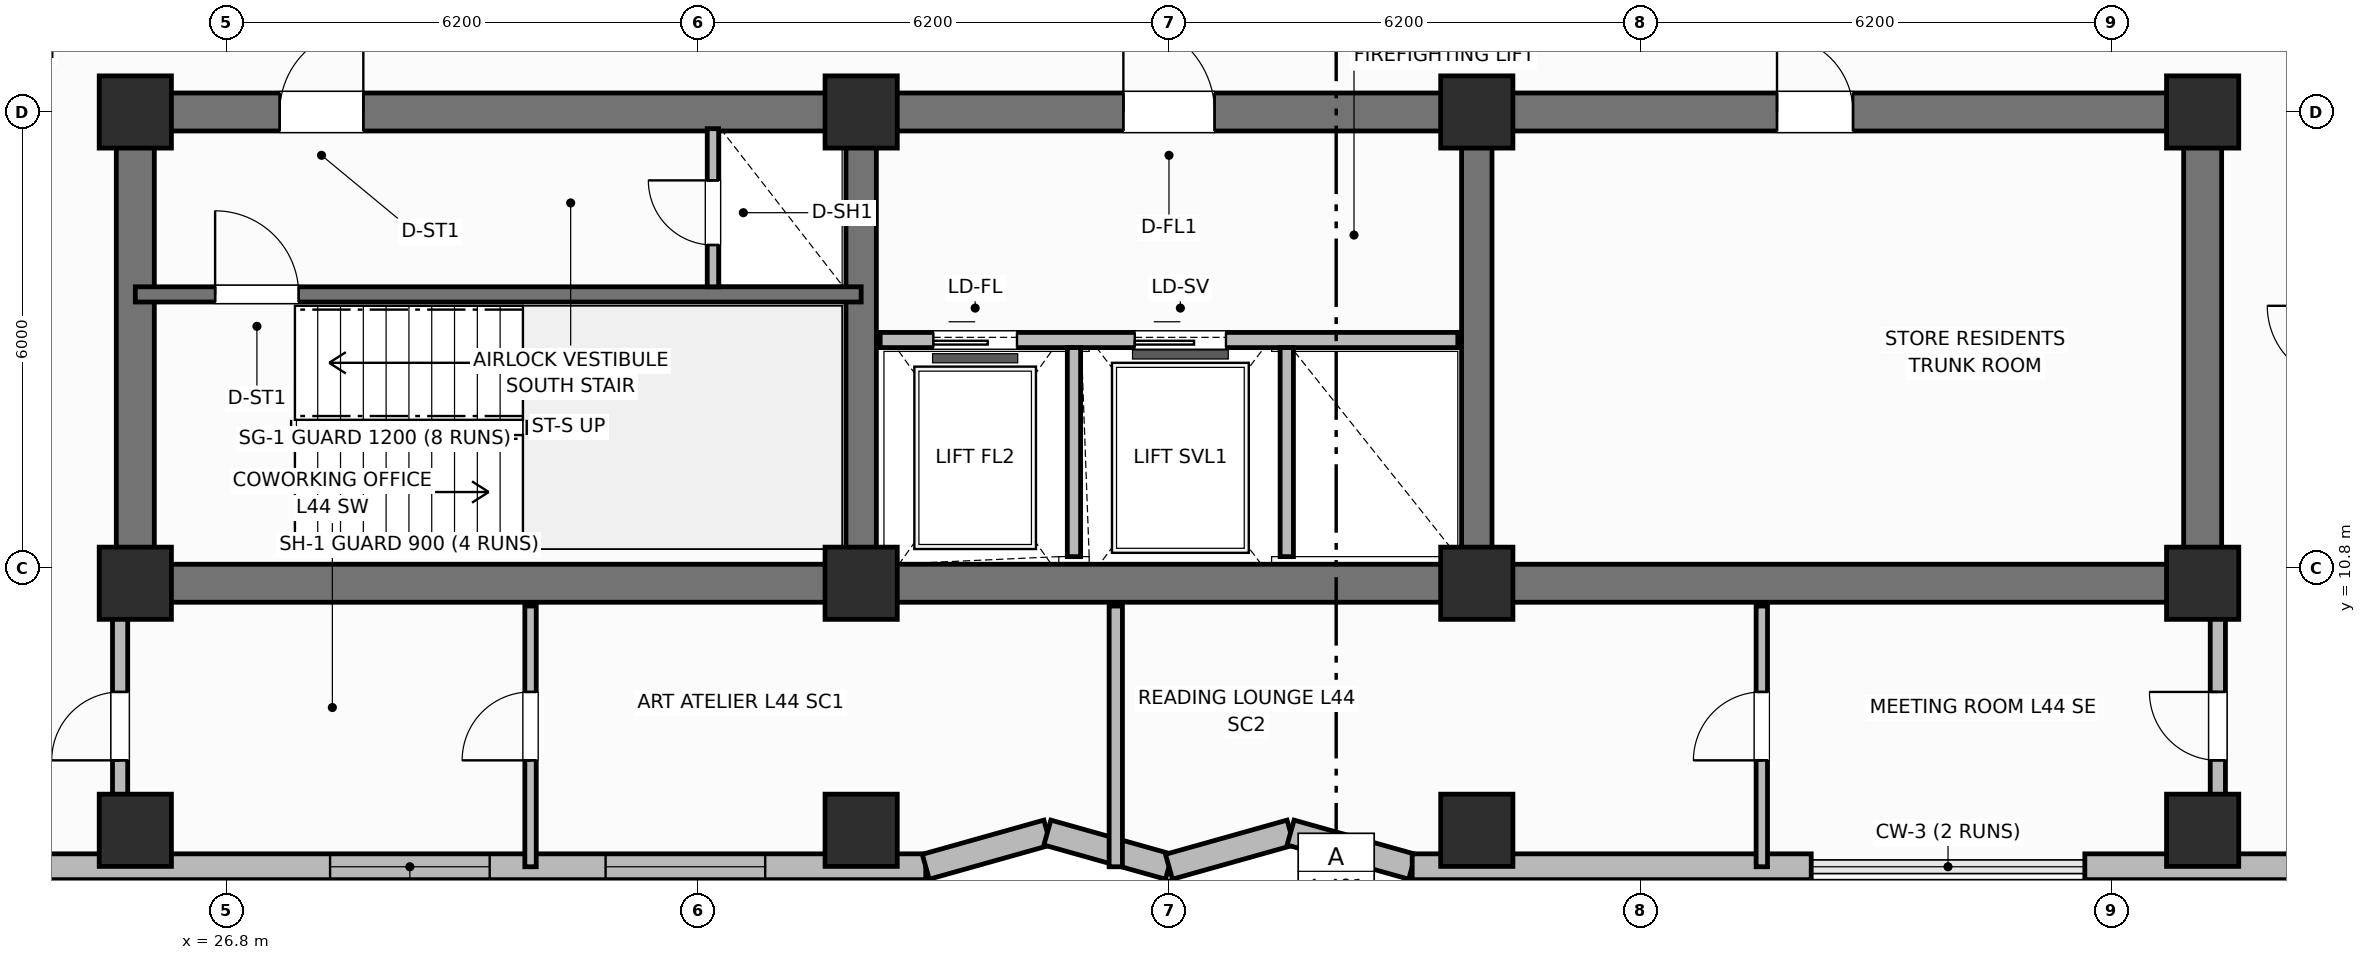
"""IFC4 building model, lengths in metres.
Left out: names, types, materials, properties, quantities, classifications, styles, units other than length and angle.
Written with IfcOpenShell. Run it as: python <this file> out.ifc"""

import sys

from ifc_helpers import new_model, si_unit, direction, frame, frame_2d, origin, origin_2d, place, context, subcontext, project, spatial, rectangle, extrude, element, fill, save


model = new_model("IFC4")
c1 = context("Model", 3, precision=1e-05, world=origin(), true_north=direction((0.0, 1.0)))
c2 = subcontext(c1, "Body", "Model", "MODEL_VIEW")
j1 = project(units=[si_unit("LENGTHUNIT", "METRE"), si_unit("PLANEANGLEUNIT", "RADIAN")], contexts=[c1])
p1 = place(None, origin())
s1 = spatial("IfcSite", under=j1, at=p1, CompositionType="ELEMENT")
p2 = place(p1, origin())
s2 = spatial("IfcBuilding", under=s1, at=p2, CompositionType="ELEMENT")
p3 = place(p2, frame((0.0, 0.0, 177.4)))
s3 = spatial("IfcBuildingStorey", under=s2, at=p3, CompositionType="ELEMENT", Elevation=177.4)
p4 = place(p3, frame((52.8, 10.6, 0.0), z_axis=(0.0, 0.0, 1.0), x_axis=(-1.0, 0.0, 0.0)))
e1 = element("IfcWall", 1, at=p4, inside=s3, PredefinedType="SHEAR", context=c2, shape_type="SweptSolid", body=[
    extrude(rectangle(XDim=27.2, YDim=0.5, at=frame_2d((13.6, 0.0))), origin(), (0.0, 0.0, 1.0), 3.7),
])
for number, where, z_axis, x_axis in (
    (2, (25.6, 10.85, 0.0), (0.0, 0.0, 1.0), (0.0, 1.0, 0.0)),
    (3, (52.8, 10.85, 0.0), (0.0, 0.0, 1.0), (0.0, 1.0, 0.0)),
):
    element("IfcWall", number, at=place(p3, frame(where, z_axis=z_axis, x_axis=x_axis)), inside=s3, PredefinedType="SHEAR", context=c2, shape_type="SweptSolid", body=[
        extrude(rectangle(XDim=5.7, YDim=0.5, at=frame_2d((2.85, 0.0))), origin(), (0.0, 0.0, 1.0), 3.7),
    ])
p5 = place(p3, frame((25.6, 16.8, 0.0), z_axis=(0.0, 0.0, 1.0), x_axis=(1.0, 0.0, 0.0)))
e4 = element("IfcWall", 4, at=p5, inside=s3, PredefinedType="SHEAR", context=c2, shape_type="SweptSolid", body=[
    extrude(rectangle(XDim=27.2, YDim=0.5, at=frame_2d((13.6, 0.0))), origin(), (0.0, 0.0, 1.0), 3.7),
])
p6 = place(p5, frame((1.9, 0.0, 0.0)))
e5 = element("IfcOpeningElement", 5, at=p6, cuts=e4, PredefinedType="OPENING", context=c2, shape_type="SweptSolid", body=[
    extrude(rectangle(XDim=1.1, YDim=2.15, at=frame_2d((0.55, 1.075))), frame((0.0, 0.26, 0.0), z_axis=(0.0, -1.0, 0.0), x_axis=(1.0, 0.0, 0.0)), (0.0, 0.0, 1.0), 0.52),
])
p7 = place(p5, frame((13.0, 0.0, 0.0)))
e6 = element("IfcOpeningElement", 6, at=p7, cuts=e4, PredefinedType="OPENING", context=c2, shape_type="SweptSolid", body=[
    extrude(rectangle(XDim=1.2, YDim=2.15, at=frame_2d((0.6, 1.075))), frame((0.0, 0.26, 0.0), z_axis=(0.0, -1.0, 0.0), x_axis=(1.0, 0.0, 0.0)), (0.0, 0.0, 1.0), 0.52),
])
p8 = place(p5, frame((21.6, 0.0, 0.0)))
e7 = element("IfcOpeningElement", 7, at=p8, cuts=e4, PredefinedType="OPENING", context=c2, shape_type="SweptSolid", body=[
    extrude(rectangle(XDim=1.0, YDim=2.15, at=frame_2d((0.5, 1.075))), frame((0.0, 0.26, 0.0), z_axis=(0.0, -1.0, 0.0), x_axis=(1.0, 0.0, 0.0)), (0.0, 0.0, 1.0), 0.52),
])
for number, where, z_axis, x_axis in (
    (8, (35.15, 10.85, 0.0), (0.0, 0.0, 1.0), (0.0, 1.0, 0.0)),
    (9, (43.25, 10.85, 0.0), (0.0, 0.0, 1.0), (0.0, 1.0, 0.0)),
):
    element("IfcWall", number, at=place(p3, frame(where, z_axis=z_axis, x_axis=x_axis)), inside=s3, PredefinedType="SHEAR", context=c2, shape_type="SweptSolid", body=[
        extrude(rectangle(XDim=5.7, YDim=0.4, at=frame_2d((2.85, 0.0))), origin(), (0.0, 0.0, 1.0), 3.7),
    ])
for number, where, z_axis, x_axis in (
    (10, (25.6, 10.6, 0.0), (0.0, 0.0, 1.0), (1.0, 0.0, 0.0)),
    (11, (25.6, 16.8, 0.0), (0.0, 0.0, 1.0), (1.0, 0.0, 0.0)),
    (12, (35.15, 10.6, 0.0), (0.0, 0.0, 1.0), (1.0, 0.0, 0.0)),
    (13, (35.15, 16.8, 0.0), (0.0, 0.0, 1.0), (1.0, 0.0, 0.0)),
    (14, (43.25, 10.6, 0.0), (0.0, 0.0, 1.0), (1.0, 0.0, 0.0)),
    (15, (43.25, 16.8, 0.0), (0.0, 0.0, 1.0), (1.0, 0.0, 0.0)),
    (16, (52.8, 10.6, 0.0), (0.0, 0.0, 1.0), (1.0, 0.0, 0.0)),
    (17, (52.8, 16.8, 0.0), (0.0, 0.0, 1.0), (1.0, 0.0, 0.0)),
    (18, (25.6, 7.35, 0.0), (0.0, 0.0, 1.0), (1.0, 0.0, 0.0)),
    (19, (35.15, 7.35, 0.0), (0.0, 0.0, 1.0), (1.0, 0.0, 0.0)),
    (20, (43.25, 7.35, 0.0), (0.0, 0.0, 1.0), (1.0, 0.0, 0.0)),
    (21, (52.8, 7.35, 0.0), (0.0, 0.0, 1.0), (1.0, 0.0, 0.0)),
):
    element("IfcColumn", number, at=place(p3, frame(where, z_axis=z_axis, x_axis=x_axis)), inside=s3, PredefinedType="COLUMN", context=c2, shape_type="SweptSolid", body=[
        extrude(rectangle(XDim=0.95, YDim=0.95, at=origin_2d()), origin(), (0.0, 0.0, 1.0), 3.7),
    ])
p9 = place(p3, frame((20.2, 6.87, 0.0), z_axis=(0.0, 0.0, 1.0), x_axis=(1.0, 0.0, 0.0)))
e22 = element("IfcWall", 22, at=p9, inside=s3, PredefinedType="SOLIDWALL", context=c2, shape_type="SweptSolid", body=[
    extrude(rectangle(XDim=15.8, YDim=0.34, at=frame_2d((7.9, 0.0))), origin(), (0.0, 0.0, 1.0), 2.72),
])
p10 = place(p9, frame((7.962, 0.0, 0.7)))
e23 = element("IfcOpeningElement", 23, at=p10, cuts=e22, PredefinedType="OPENING", context=c2, shape_type="SweptSolid", body=[
    extrude(rectangle(XDim=2.1, YDim=1.9, at=frame_2d((1.05, 0.95))), frame((0.0, 0.18, 0.0), z_axis=(0.0, -1.0, 0.0), x_axis=(1.0, 0.0, 0.0)), (0.0, 0.0, 1.0), 0.36),
])
p11 = place(p9, frame((11.587, 0.0, 0.7)))
e24 = element("IfcOpeningElement", 24, at=p11, cuts=e22, PredefinedType="OPENING", context=c2, shape_type="SweptSolid", body=[
    extrude(rectangle(XDim=2.1, YDim=1.9, at=frame_2d((1.05, 0.95))), frame((0.0, 0.18, 0.0), z_axis=(0.0, -1.0, 0.0), x_axis=(1.0, 0.0, 0.0)), (0.0, 0.0, 1.0), 0.36),
])
p12 = place(p3, frame((36.0, 6.87, 0.0), z_axis=(0.0, 0.0, 1.0), x_axis=(0.962662902433, 0.270703040766, 0.0)))
e25 = element("IfcWall", 25, at=p12, inside=s3, PredefinedType="SOLIDWALL", context=c2, shape_type="SweptSolid", body=[
    extrude(rectangle(XDim=1.662, YDim=0.34, at=frame_2d((0.831, 0.0))), origin(), (0.0, 0.0, 1.0), 2.72),
])
p13 = place(p3, frame((37.6, 7.32, 0.0), z_axis=(0.0, 0.0, 1.0), x_axis=(0.962652136636, -0.270741322725, 0.0)))
e26 = element("IfcWall", 26, at=p13, inside=s3, PredefinedType="SOLIDWALL", context=c2, shape_type="SweptSolid", body=[
    extrude(rectangle(XDim=1.662, YDim=0.34, at=frame_2d((0.831, 0.0))), origin(), (0.0, 0.0, 1.0), 2.72),
])
p14 = place(p3, frame((39.2, 6.87, 0.0), z_axis=(0.0, 0.0, 1.0), x_axis=(0.962662902433, 0.270703040766, 0.0)))
e27 = element("IfcWall", 27, at=p14, inside=s3, PredefinedType="SOLIDWALL", context=c2, shape_type="SweptSolid", body=[
    extrude(rectangle(XDim=1.662, YDim=0.34, at=frame_2d((0.831, 0.0))), origin(), (0.0, 0.0, 1.0), 2.72),
])
p15 = place(p3, frame((40.8, 7.32, 0.0), z_axis=(0.0, 0.0, 1.0), x_axis=(0.962652136636, -0.270741322725, 0.0)))
e28 = element("IfcWall", 28, at=p15, inside=s3, PredefinedType="SOLIDWALL", context=c2, shape_type="SweptSolid", body=[
    extrude(rectangle(XDim=1.662, YDim=0.34, at=frame_2d((0.831, 0.0))), origin(), (0.0, 0.0, 1.0), 2.72),
])
p16 = place(p3, frame((42.4, 6.87, 0.0), z_axis=(0.0, 0.0, 1.0), x_axis=(1.0, 0.0, 0.0)))
e29 = element("IfcWall", 29, at=p16, inside=s3, PredefinedType="SOLIDWALL", context=c2, shape_type="SweptSolid", body=[
    extrude(rectangle(XDim=5.25, YDim=0.34, at=frame_2d((2.625, 0.0))), origin(), (0.0, 0.0, 1.0), 2.72),
])
p17 = place(p3, frame((51.25, 6.87, 0.0), z_axis=(0.0, 0.0, 1.0), x_axis=(1.0, 0.0, 0.0)))
e30 = element("IfcWall", 30, at=p17, inside=s3, PredefinedType="SOLIDWALL", context=c2, shape_type="SweptSolid", body=[
    extrude(rectangle(XDim=6.95, YDim=0.34, at=frame_2d((3.475, 0.0))), origin(), (0.0, 0.0, 1.0), 2.72),
])
p18 = place(p3, frame((25.6, 14.4, 0.0), z_axis=(0.0, 0.0, 1.0), x_axis=(1.0, 0.0, 0.0)))
e31 = element("IfcWall", 31, at=p18, inside=s3, PredefinedType="SHEAR", context=c2, shape_type="SweptSolid", body=[
    extrude(rectangle(XDim=9.55, YDim=0.2, at=frame_2d((4.775, 0.0))), origin(), (0.0, 0.0, 1.0), 3.7),
])
p19 = place(p18, frame((1.05, 0.0, 0.0)))
e32 = element("IfcOpeningElement", 32, at=p19, cuts=e31, PredefinedType="OPENING", context=c2, shape_type="SweptSolid", body=[
    extrude(rectangle(XDim=1.1, YDim=2.15, at=frame_2d((0.55, 1.075))), frame((0.0, 0.11, 0.0), z_axis=(0.0, -1.0, 0.0), x_axis=(1.0, 0.0, 0.0)), (0.0, 0.0, 1.0), 0.22),
])
p20 = place(p3, frame((33.2, 14.5, 0.0), z_axis=(0.0, 0.0, 1.0), x_axis=(0.0, 1.0, 0.0)))
e33 = element("IfcWall", 33, at=p20, inside=s3, PredefinedType="PARTITIONING", context=c2, shape_type="SweptSolid", body=[
    extrude(rectangle(XDim=2.08, YDim=0.15, at=frame_2d((1.04, 0.0))), origin(), (0.0, 0.0, 1.0), 2.55),
])
p21 = place(p20, frame((0.55, 0.0, 0.0)))
e34 = element("IfcOpeningElement", 34, at=p21, cuts=e33, PredefinedType="OPENING", context=c2, shape_type="SweptSolid", body=[
    extrude(rectangle(XDim=0.85, YDim=2.05, at=frame_2d((0.425, 1.025))), frame((0.0, 0.085, 0.0), z_axis=(0.0, -1.0, 0.0), x_axis=(1.0, 0.0, 0.0)), (0.0, 0.0, 1.0), 0.17),
])
p22 = place(p3, frame((35.4, 13.8, 0.0), z_axis=(0.0, 0.0, 1.0), x_axis=(1.0, 0.0, 0.0)))
e35 = element("IfcWall", 35, at=p22, inside=s3, PredefinedType="PARTITIONING", context=c2, shape_type="SweptSolid", body=[
    extrude(rectangle(XDim=7.6, YDim=0.2, at=frame_2d((3.8, 0.0))), origin(), (0.0, 0.0, 1.0), 2.32),
])
p23 = place(p22, frame((0.7, 0.0, 0.0)))
e36 = element("IfcOpeningElement", 36, at=p23, cuts=e35, PredefinedType="OPENING", context=c2, shape_type="SweptSolid", body=[
    extrude(rectangle(XDim=1.1, YDim=2.15, at=frame_2d((0.55, 1.075))), frame((0.0, 0.11, 0.0), z_axis=(0.0, -1.0, 0.0), x_axis=(1.0, 0.0, 0.0)), (0.0, 0.0, 1.0), 0.22),
])
p24 = place(p22, frame((3.35, 0.0, 0.0)))
e37 = element("IfcOpeningElement", 37, at=p24, cuts=e35, PredefinedType="OPENING", context=c2, shape_type="SweptSolid", body=[
    extrude(rectangle(XDim=1.2, YDim=2.15, at=frame_2d((0.6, 1.075))), frame((0.0, 0.11, 0.0), z_axis=(0.0, -1.0, 0.0), x_axis=(1.0, 0.0, 0.0)), (0.0, 0.0, 1.0), 0.22),
])
for number, where, z_axis, x_axis in (
    (38, (37.95, 10.95, 0.0), (0.0, 0.0, 1.0), (0.0, 1.0, 0.0)),
    (39, (40.75, 10.95, 0.0), (0.0, 0.0, 1.0), (0.0, 1.0, 0.0)),
):
    element("IfcWall", number, at=place(p3, frame(where, z_axis=z_axis, x_axis=x_axis)), inside=s3, PredefinedType="PARTITIONING", context=c2, shape_type="SweptSolid", body=[
        extrude(rectangle(XDim=2.75, YDim=0.175, at=frame_2d((1.375, 0.0))), origin(), (0.0, 0.0, 1.0), 2.55),
    ])
p25 = place(p3, frame((30.8, 6.87, 0.0), z_axis=(0.0, 0.0, 1.0), x_axis=(0.0, 1.0, 0.0)))
e40 = element("IfcWall", 40, at=p25, inside=s3, PredefinedType="PARTITIONING", context=c2, shape_type="SweptSolid", body=[
    extrude(rectangle(XDim=3.43, YDim=0.15, at=frame_2d((1.715, 0.0))), origin(), (0.0, 0.0, 1.0), 2.55),
])
p26 = place(p25, frame((1.4, 0.0, 0.0)))
e41 = element("IfcOpeningElement", 41, at=p26, cuts=e40, PredefinedType="OPENING", context=c2, shape_type="SweptSolid", body=[
    extrude(rectangle(XDim=0.9, YDim=2.1, at=frame_2d((0.45, 1.05))), frame((0.0, 0.085, 0.0), z_axis=(0.0, -1.0, 0.0), x_axis=(1.0, 0.0, 0.0)), (0.0, 0.0, 1.0), 0.17),
])
p27 = place(p3, frame((38.5, 6.87, 0.0), z_axis=(0.0, 0.0, 1.0), x_axis=(0.0, 1.0, 0.0)))
e42 = element("IfcWall", 42, at=p27, inside=s3, PredefinedType="PARTITIONING", context=c2, shape_type="SweptSolid", body=[
    extrude(rectangle(XDim=3.43, YDim=0.175, at=frame_2d((1.715, 0.0))), origin(), (0.0, 0.0, 1.0), 2.55),
])
p28 = place(p3, frame((47.0, 6.87, 0.0), z_axis=(0.0, 0.0, 1.0), x_axis=(0.0, 1.0, 0.0)))
e43 = element("IfcWall", 43, at=p28, inside=s3, PredefinedType="PARTITIONING", context=c2, shape_type="SweptSolid", body=[
    extrude(rectangle(XDim=3.43, YDim=0.15, at=frame_2d((1.715, 0.0))), origin(), (0.0, 0.0, 1.0), 2.55),
])
p29 = place(p28, frame((1.4, 0.0, 0.0)))
e44 = element("IfcOpeningElement", 44, at=p29, cuts=e43, PredefinedType="OPENING", context=c2, shape_type="SweptSolid", body=[
    extrude(rectangle(XDim=0.9, YDim=2.1, at=frame_2d((0.45, 1.05))), frame((0.0, 0.085, 0.0), z_axis=(0.0, -1.0, 0.0), x_axis=(1.0, 0.0, 0.0)), (0.0, 0.0, 1.0), 0.17),
])
p30 = place(p3, frame((25.4, 7.62, 0.0), z_axis=(0.0, 0.0, 1.0), x_axis=(0.0, 1.0, 0.0)))
e45 = element("IfcWall", 45, at=p30, inside=s3, PredefinedType="PARTITIONING", context=c2, shape_type="SweptSolid", body=[
    extrude(rectangle(XDim=2.68, YDim=0.2, at=frame_2d((1.34, 0.0))), origin(), (0.0, 0.0, 1.0), 2.55),
])
p31 = place(p30, frame((0.65, 0.0, 0.0)))
e46 = element("IfcOpeningElement", 46, at=p31, cuts=e45, PredefinedType="OPENING", context=c2, shape_type="SweptSolid", body=[
    extrude(rectangle(XDim=0.9, YDim=2.1, at=frame_2d((0.45, 1.05))), frame((0.0, 0.11, 0.0), z_axis=(0.0, -1.0, 0.0), x_axis=(1.0, 0.0, 0.0)), (0.0, 0.0, 1.0), 0.22),
])
p32 = place(p3, frame((53.0, 7.62, 0.0), z_axis=(0.0, 0.0, 1.0), x_axis=(0.0, 1.0, 0.0)))
e47 = element("IfcWall", 47, at=p32, inside=s3, PredefinedType="PARTITIONING", context=c2, shape_type="SweptSolid", body=[
    extrude(rectangle(XDim=2.68, YDim=0.2, at=frame_2d((1.34, 0.0))), origin(), (0.0, 0.0, 1.0), 2.55),
])
p33 = place(p32, frame((0.65, 0.0, 0.0)))
e48 = element("IfcOpeningElement", 48, at=p33, cuts=e47, PredefinedType="OPENING", context=c2, shape_type="SweptSolid", body=[
    extrude(rectangle(XDim=0.9, YDim=2.1, at=frame_2d((0.45, 1.05))), frame((0.0, 0.11, 0.0), z_axis=(0.0, -1.0, 0.0), x_axis=(1.0, 0.0, 0.0)), (0.0, 0.0, 1.0), 0.22),
])
p34 = place(p10, origin())
e49 = element("IfcWindow", 49, at=p34, inside=s3, PartitioningType="SINGLE_PANEL", PredefinedType="WINDOW", context=c2, shape_type="SweptSolid", body=[
    extrude(rectangle(XDim=2.1, YDim=1.9, at=frame_2d((1.05, 0.95))), frame((0.0, 0.03, 0.0), z_axis=(0.0, -1.0, 0.0), x_axis=(1.0, 0.0, 0.0)), (0.0, 0.0, 1.0), 0.06),
])
fill(e23, e49)
p35 = place(p11, origin())
e50 = element("IfcWindow", 50, at=p35, inside=s3, PartitioningType="SINGLE_PANEL", PredefinedType="WINDOW", context=c2, shape_type="SweptSolid", body=[
    extrude(rectangle(XDim=2.1, YDim=1.9, at=frame_2d((1.05, 0.95))), frame((0.0, 0.03, 0.0), z_axis=(0.0, -1.0, 0.0), x_axis=(1.0, 0.0, 0.0)), (0.0, 0.0, 1.0), 0.06),
])
fill(e24, e50)
p36 = place(p19, origin())
e51 = element("IfcDoor", 51, at=p36, inside=s3, OperationType="SINGLE_SWING_LEFT", PredefinedType="DOOR", context=c2, shape_type="SweptSolid", body=[
    extrude(rectangle(XDim=1.1, YDim=2.15, at=frame_2d((0.55, 1.075))), frame((0.0, 0.025, 0.0), z_axis=(0.0, -1.0, 0.0), x_axis=(1.0, 0.0, 0.0)), (0.0, 0.0, 1.0), 0.05),
])
fill(e32, e51)
p37 = place(p21, origin())
e52 = element("IfcDoor", 52, at=p37, inside=s3, OperationType="SINGLE_SWING_RIGHT", PredefinedType="TRAPDOOR", context=c2, shape_type="SweptSolid", body=[
    extrude(rectangle(XDim=0.85, YDim=2.05, at=frame_2d((0.425, 1.025))), frame((0.0, 0.025, 0.0), z_axis=(0.0, -1.0, 0.0), x_axis=(1.0, 0.0, 0.0)), (0.0, 0.0, 1.0), 0.05),
])
fill(e34, e52)
p38 = place(p23, origin())
e53 = element("IfcDoor", 53, at=p38, inside=s3, OperationType="SLIDING_TO_LEFT", PredefinedType="DOOR", context=c2, shape_type="SweptSolid", body=[
    extrude(rectangle(XDim=1.1, YDim=2.15, at=frame_2d((0.55, 1.075))), frame((0.0, 0.025, 0.0), z_axis=(0.0, -1.0, 0.0), x_axis=(1.0, 0.0, 0.0)), (0.0, 0.0, 1.0), 0.05),
])
fill(e36, e53)
p39 = place(p24, origin())
e54 = element("IfcDoor", 54, at=p39, inside=s3, OperationType="SLIDING_TO_LEFT", PredefinedType="DOOR", context=c2, shape_type="SweptSolid", body=[
    extrude(rectangle(XDim=1.2, YDim=2.15, at=frame_2d((0.6, 1.075))), frame((0.0, 0.025, 0.0), z_axis=(0.0, -1.0, 0.0), x_axis=(1.0, 0.0, 0.0)), (0.0, 0.0, 1.0), 0.05),
])
fill(e37, e54)
p40 = place(p26, origin())
e55 = element("IfcDoor", 55, at=p40, inside=s3, OperationType="SINGLE_SWING_LEFT", PredefinedType="DOOR", context=c2, shape_type="SweptSolid", body=[
    extrude(rectangle(XDim=0.9, YDim=2.1, at=frame_2d((0.45, 1.05))), frame((0.0, 0.025, 0.0), z_axis=(0.0, -1.0, 0.0), x_axis=(1.0, 0.0, 0.0)), (0.0, 0.0, 1.0), 0.05),
])
fill(e41, e55)
p41 = place(p29, origin())
e56 = element("IfcDoor", 56, at=p41, inside=s3, OperationType="SINGLE_SWING_LEFT", PredefinedType="DOOR", context=c2, shape_type="SweptSolid", body=[
    extrude(rectangle(XDim=0.9, YDim=2.1, at=frame_2d((0.45, 1.05))), frame((0.0, 0.025, 0.0), z_axis=(0.0, -1.0, 0.0), x_axis=(1.0, 0.0, 0.0)), (0.0, 0.0, 1.0), 0.05),
])
fill(e44, e56)
p42 = place(p31, origin())
e57 = element("IfcDoor", 57, at=p42, inside=s3, OperationType="SINGLE_SWING_LEFT", PredefinedType="DOOR", context=c2, shape_type="SweptSolid", body=[
    extrude(rectangle(XDim=0.9, YDim=2.1, at=frame_2d((0.45, 1.05))), frame((0.0, 0.025, 0.0), z_axis=(0.0, -1.0, 0.0), x_axis=(1.0, 0.0, 0.0)), (0.0, 0.0, 1.0), 0.05),
])
fill(e46, e57)
p43 = place(p33, origin())
e58 = element("IfcDoor", 58, at=p43, inside=s3, OperationType="SINGLE_SWING_RIGHT", PredefinedType="DOOR", context=c2, shape_type="SweptSolid", body=[
    extrude(rectangle(XDim=0.9, YDim=2.1, at=frame_2d((0.45, 1.05))), frame((0.0, 0.025, 0.0), z_axis=(0.0, -1.0, 0.0), x_axis=(1.0, 0.0, 0.0)), (0.0, 0.0, 1.0), 0.05),
])
fill(e48, e58)
p44 = place(p6, origin())
e59 = element("IfcDoor", 59, at=p44, inside=s3, OperationType="SINGLE_SWING_RIGHT", PredefinedType="DOOR", context=c2, shape_type="SweptSolid", body=[
    extrude(rectangle(XDim=1.1, YDim=2.15, at=frame_2d((0.55, 1.075))), frame((0.0, 0.025, 0.0), z_axis=(0.0, -1.0, 0.0), x_axis=(1.0, 0.0, 0.0)), (0.0, 0.0, 1.0), 0.05),
])
fill(e5, e59)
p45 = place(p7, origin())
e60 = element("IfcDoor", 60, at=p45, inside=s3, OperationType="SINGLE_SWING_LEFT", PredefinedType="DOOR", context=c2, shape_type="SweptSolid", body=[
    extrude(rectangle(XDim=1.2, YDim=2.15, at=frame_2d((0.6, 1.075))), frame((0.0, 0.025, 0.0), z_axis=(0.0, -1.0, 0.0), x_axis=(1.0, 0.0, 0.0)), (0.0, 0.0, 1.0), 0.05),
])
fill(e6, e60)
p46 = place(p8, origin())
e61 = element("IfcDoor", 61, at=p46, inside=s3, OperationType="SINGLE_SWING_LEFT", PredefinedType="DOOR", context=c2, shape_type="SweptSolid", body=[
    extrude(rectangle(XDim=1.0, YDim=2.15, at=frame_2d((0.5, 1.075))), frame((0.0, 0.025, 0.0), z_axis=(0.0, -1.0, 0.0), x_axis=(1.0, 0.0, 0.0)), (0.0, 0.0, 1.0), 0.05),
])
fill(e7, e61)
save(model, sys.argv[1])
